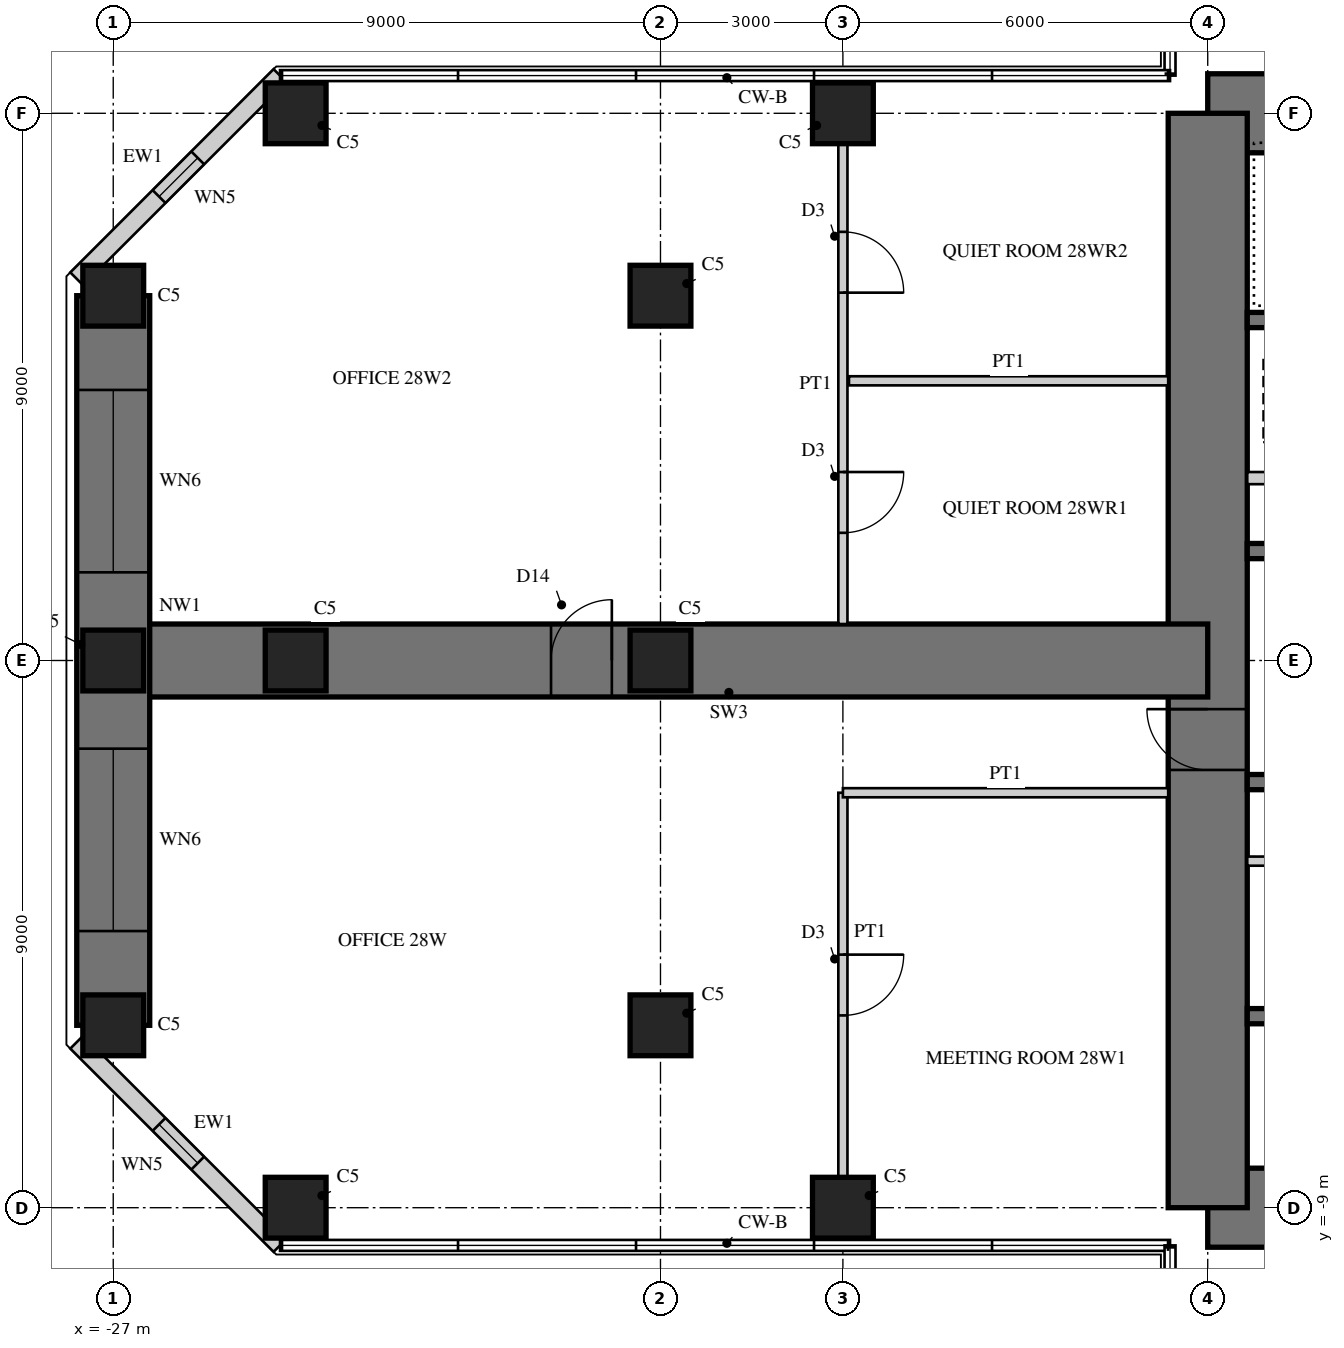
"""IFC4 building model, lengths in metres.
Left out: names, types, materials, properties, quantities, classifications, styles, units other than length and angle.
Written with IfcOpenShell. Run it as: python <this file> out.ifc"""

import sys

from ifc_helpers import new_model, si_unit, direction, frame, frame_2d, origin, origin_2d, place, context, subcontext, project, spatial, rectangle, hollow_rectangle, extrude, element, fill, save


model = new_model("IFC4")
c1 = context("Model", 3, precision=1e-05, world=origin(), true_north=direction((0.0, 1.0)))
c2 = subcontext(c1, "Body", "Model", "MODEL_VIEW")
j1 = project(units=[si_unit("LENGTHUNIT", "METRE"), si_unit("PLANEANGLEUNIT", "RADIAN")], contexts=[c1])
p1 = place(None, origin())
s1 = spatial("IfcSite", under=j1, at=p1, CompositionType="ELEMENT")
p2 = place(p1, origin())
s2 = spatial("IfcBuilding", under=s1, at=p2, CompositionType="ELEMENT")
p3 = place(p2, frame((0.0, 0.0, 116.5)))
s3 = spatial("IfcBuildingStorey", under=s2, at=p3, CompositionType="ELEMENT", Elevation=116.5)
p4 = place(p3, frame((9.0, 9.0, 0.0), z_axis=(0.0, 0.0, 1.0), x_axis=(-1.0, 0.0, 0.0)))
e1 = element("IfcWall", 1, at=p4, inside=s3, PredefinedType="SHEAR", context=c2, shape_type="SweptSolid", body=[
    extrude(rectangle(XDim=18.0, YDim=1.3, at=frame_2d((9.0, 0.0))), origin(), (0.0, 0.0, 1.0), 4.0),
])
p5 = place(p4, frame((9.8, 0.0, 0.0)))
e2 = element("IfcOpeningElement", 2, at=p5, cuts=e1, PredefinedType="OPENING", context=c2, shape_type="SweptSolid", body=[
    extrude(rectangle(XDim=1.0, YDim=2.4, at=frame_2d((0.5, 1.2))), frame((0.0, 0.66, 0.0), z_axis=(0.0, -1.0, 0.0), x_axis=(1.0, 0.0, 0.0)), (0.0, 0.0, 1.0), 1.32),
])
p6 = place(p3, frame((-9.0, -9.0, 0.0), z_axis=(0.0, 0.0, 1.0), x_axis=(1.0, 0.0, 0.0)))
e3 = element("IfcWall", 3, at=p6, inside=s3, PredefinedType="SHEAR", context=c2, shape_type="SweptSolid", body=[
    extrude(rectangle(XDim=18.0, YDim=1.3, at=frame_2d((9.0, 0.0))), origin(), (0.0, 0.0, 1.0), 4.0),
])
p7 = place(p6, frame((9.8, 0.0, 0.0)))
e4 = element("IfcOpeningElement", 4, at=p7, cuts=e3, PredefinedType="OPENING", context=c2, shape_type="SweptSolid", body=[
    extrude(rectangle(XDim=1.0, YDim=2.4, at=frame_2d((0.5, 1.2))), frame((0.0, 0.66, 0.0), z_axis=(0.0, -1.0, 0.0), x_axis=(1.0, 0.0, 0.0)), (0.0, 0.0, 1.0), 1.32),
])
p8 = place(p3, frame((-9.0, 9.0, 0.0), z_axis=(0.0, 0.0, 1.0), x_axis=(0.0, -1.0, 0.0)))
e5 = element("IfcWall", 5, at=p8, inside=s3, PredefinedType="SHEAR", context=c2, shape_type="SweptSolid", body=[
    extrude(rectangle(XDim=18.0, YDim=1.3, at=frame_2d((9.0, 0.0))), origin(), (0.0, 0.0, 1.0), 4.0),
])
p9 = place(p8, frame((9.8, 0.0, 0.0)))
e6 = element("IfcOpeningElement", 6, at=p9, cuts=e5, PredefinedType="OPENING", context=c2, shape_type="SweptSolid", body=[
    extrude(rectangle(XDim=1.0, YDim=2.4, at=frame_2d((0.5, 1.2))), frame((0.0, 0.66, 0.0), z_axis=(0.0, -1.0, 0.0), x_axis=(1.0, 0.0, 0.0)), (0.0, 0.0, 1.0), 1.32),
])
p10 = place(p3, frame((-2.125, 1.8, 0.0), z_axis=(0.0, 0.0, 1.0), x_axis=(-1.0, 0.0, 0.0)))
e7 = element("IfcWall", 7, at=p10, inside=s3, PredefinedType="SHEAR", context=c2, shape_type="SweptSolid", body=[
    extrude(rectangle(XDim=6.225, YDim=0.25, at=frame_2d((3.113, 0.0))), origin(), (0.0, 0.0, 1.0), 4.0),
])
p11 = place(p3, frame((-2.125, 5.6, 0.0), z_axis=(0.0, 0.0, 1.0), x_axis=(-1.0, 0.0, 0.0)))
e8 = element("IfcWall", 8, at=p11, inside=s3, PredefinedType="SHEAR", context=c2, shape_type="SweptSolid", body=[
    extrude(rectangle(XDim=6.225, YDim=0.25, at=frame_2d((3.113, 0.0))), origin(), (0.0, 0.0, 1.0), 4.0),
])
p12 = place(p11, frame((0.175, 0.0, 0.0)))
e9 = element("IfcOpeningElement", 9, at=p12, cuts=e8, PredefinedType="OPENING", context=c2, shape_type="SweptSolid", body=[
    extrude(rectangle(XDim=1.0, YDim=2.1, at=frame_2d((0.5, 1.05))), frame((0.0, 0.135, 0.0), z_axis=(0.0, -1.0, 0.0), x_axis=(1.0, 0.0, 0.0)), (0.0, 0.0, 1.0), 0.27),
])
p13 = place(p3, frame((-5.725, 3.0, 0.0), z_axis=(0.0, 0.0, 1.0), x_axis=(-1.0, 0.0, 0.0)))
e10 = element("IfcWall", 10, at=p13, inside=s3, PredefinedType="PARTITIONING", context=c2, shape_type="SweptSolid", body=[
    extrude(rectangle(XDim=2.625, YDim=0.2, at=frame_2d((1.312, 0.0))), origin(), (0.0, 0.0, 1.0), 4.0),
])
for number, where, z_axis, x_axis in (
    (11, (-1.925, -2.0, 0.0), (0.0, 0.0, 1.0), (-1.0, 0.0, 0.0)),
    (12, (-1.925, -5.85, 0.0), (0.0, 0.0, 1.0), (-1.0, 0.0, 0.0)),
):
    element("IfcWall", number, at=place(p3, frame(where, z_axis=z_axis, x_axis=x_axis)), inside=s3, PredefinedType="SHEAR", context=c2, shape_type="SweptSolid", body=[
        extrude(rectangle(XDim=6.425, YDim=0.25, at=frame_2d((3.212, 0.0))), origin(), (0.0, 0.0, 1.0), 4.0),
    ])
p14 = place(p3, frame((-1.925, -3.3, 0.0), z_axis=(0.0, 0.0, 1.0), x_axis=(-1.0, 0.0, 0.0)))
e13 = element("IfcWall", 13, at=p14, inside=s3, PredefinedType="PARTITIONING", context=c2, shape_type="SweptSolid", body=[
    extrude(rectangle(XDim=6.425, YDim=0.15, at=frame_2d((3.212, 0.0))), origin(), (0.0, 0.0, 1.0), 4.0),
])
p15 = place(p14, frame((0.075, 0.0, 0.0)))
e14 = element("IfcOpeningElement", 14, at=p15, cuts=e13, PredefinedType="OPENING", context=c2, shape_type="SweptSolid", body=[
    extrude(rectangle(XDim=0.8, YDim=2.1, at=frame_2d((0.4, 1.05))), frame((0.0, 0.085, 0.0), z_axis=(0.0, -1.0, 0.0), x_axis=(1.0, 0.0, 0.0)), (0.0, 0.0, 1.0), 0.17),
])
p16 = place(p14, frame((3.675, 0.0, 0.0)))
e15 = element("IfcOpeningElement", 15, at=p16, cuts=e13, PredefinedType="OPENING", context=c2, shape_type="SweptSolid", body=[
    extrude(rectangle(XDim=0.8, YDim=2.1, at=frame_2d((0.4, 1.05))), frame((0.0, 0.085, 0.0), z_axis=(0.0, -1.0, 0.0), x_axis=(1.0, 0.0, 0.0)), (0.0, 0.0, 1.0), 0.17),
])
p17 = place(p3, frame((-9.0, 0.0, 0.0), z_axis=(0.0, 0.0, 1.0), x_axis=(-1.0, 0.0, 0.0)))
e16 = element("IfcWall", 16, at=p17, inside=s3, PredefinedType="SHEAR", context=c2, shape_type="SweptSolid", body=[
    extrude(rectangle(XDim=18.0, YDim=1.2, at=frame_2d((9.0, 0.0))), origin(), (0.0, 0.0, 1.0), 4.0),
])
p18 = place(p17, frame((9.8, 0.0, 0.0)))
e17 = element("IfcOpeningElement", 17, at=p18, cuts=e16, PredefinedType="OPENING", context=c2, shape_type="SweptSolid", body=[
    extrude(rectangle(XDim=1.0, YDim=2.2, at=frame_2d((0.5, 1.1))), frame((0.0, 0.61, 0.0), z_axis=(0.0, -1.0, 0.0), x_axis=(1.0, 0.0, 0.0)), (0.0, 0.0, 1.0), 1.22),
])
p19 = place(p3, frame((-27.0, 6.0, 0.0), z_axis=(0.0, 0.0, 1.0), x_axis=(0.0, -1.0, 0.0)))
e18 = element("IfcWall", 18, at=p19, inside=s3, PredefinedType="SHEAR", context=c2, shape_type="SweptSolid", body=[
    extrude(rectangle(XDim=12.0, YDim=1.2, at=frame_2d((6.0, 0.0))), origin(), (0.0, 0.0, 1.0), 4.0),
])
p20 = place(p19, frame((1.55, 0.0, 0.6)))
e19 = element("IfcOpeningElement", 19, at=p20, cuts=e18, PredefinedType="OPENING", context=c2, shape_type="SweptSolid", body=[
    extrude(rectangle(XDim=3.0, YDim=2.4, at=frame_2d((1.5, 1.2))), frame((0.0, 0.61, 0.0), z_axis=(0.0, -1.0, 0.0), x_axis=(1.0, 0.0, 0.0)), (0.0, 0.0, 1.0), 1.22),
])
p21 = place(p19, frame((7.45, 0.0, 0.6)))
e20 = element("IfcOpeningElement", 20, at=p21, cuts=e18, PredefinedType="OPENING", context=c2, shape_type="SweptSolid", body=[
    extrude(rectangle(XDim=3.0, YDim=2.4, at=frame_2d((1.5, 1.2))), frame((0.0, 0.61, 0.0), z_axis=(0.0, -1.0, 0.0), x_axis=(1.0, 0.0, 0.0)), (0.0, 0.0, 1.0), 1.22),
])
for number, where, z_axis, x_axis in (
    (21, (-15.0, 9.0, 0.0), (0.0, 0.0, 1.0), (1.0, 0.0, 0.0)),
    (22, (-24.0, 9.0, 0.0), (0.0, 0.0, 1.0), (1.0, 0.0, 0.0)),
    (23, (-15.0, -9.0, 0.0), (0.0, 0.0, 1.0), (1.0, 0.0, 0.0)),
    (24, (-24.0, -9.0, 0.0), (0.0, 0.0, 1.0), (1.0, 0.0, 0.0)),
    (25, (-27.0, 6.0, 0.0), (0.0, 0.0, 1.0), (1.0, 0.0, 0.0)),
    (26, (-27.0, 0.0, 0.0), (0.0, 0.0, 1.0), (1.0, 0.0, 0.0)),
    (27, (-27.0, -6.0, 0.0), (0.0, 0.0, 1.0), (1.0, 0.0, 0.0)),
    (28, (-18.0, 6.0, 0.0), (0.0, 0.0, 1.0), (1.0, 0.0, 0.0)),
    (29, (-18.0, 0.0, 0.0), (0.0, 0.0, 1.0), (1.0, 0.0, 0.0)),
    (30, (-18.0, -6.0, 0.0), (0.0, 0.0, 1.0), (1.0, 0.0, 0.0)),
    (31, (-24.0, 0.0, 0.0), (0.0, 0.0, 1.0), (1.0, 0.0, 0.0)),
):
    element("IfcColumn", number, at=place(p3, frame(where, z_axis=z_axis, x_axis=x_axis)), inside=s3, PredefinedType="COLUMN", context=c2, shape_type="SweptSolid", body=[
        extrude(rectangle(XDim=1.0, YDim=1.0, at=origin_2d()), origin(), (0.0, 0.0, 1.0), 4.0),
    ])
p22 = place(p3, frame((-24.257, 9.62, 0.0), z_axis=(0.0, 0.0, 1.0), x_axis=(-0.707106781187, -0.707106781187, 0.0)))
e32 = element("IfcWall", 32, at=p22, inside=s3, PredefinedType="SOLIDWALL", context=c2, shape_type="SweptSolid", body=[
    extrude(rectangle(XDim=4.728, YDim=0.3, at=frame_2d((2.364, 0.0))), origin(), (0.0, 0.0, 1.0), 3.8),
])
p23 = place(p22, frame((1.914, 0.0, 0.3)))
e33 = element("IfcOpeningElement", 33, at=p23, cuts=e32, PredefinedType="OPENING", context=c2, shape_type="SweptSolid", body=[
    extrude(rectangle(XDim=0.9, YDim=2.4, at=frame_2d((0.45, 1.2))), frame((0.0, 0.16, 0.0), z_axis=(0.0, -1.0, 0.0), x_axis=(1.0, 0.0, 0.0)), (0.0, 0.0, 1.0), 0.32),
])
p24 = place(p3, frame((-27.6, -6.277, 0.0), z_axis=(0.0, 0.0, 1.0), x_axis=(0.707106781187, -0.707106781187, 0.0)))
e34 = element("IfcWall", 34, at=p24, inside=s3, PredefinedType="SOLIDWALL", context=c2, shape_type="SweptSolid", body=[
    extrude(rectangle(XDim=4.728, YDim=0.3, at=frame_2d((2.364, 0.0))), origin(), (0.0, 0.0, 1.0), 3.8),
])
p25 = place(p24, frame((1.914, 0.0, 0.3)))
e35 = element("IfcOpeningElement", 35, at=p25, cuts=e34, PredefinedType="OPENING", context=c2, shape_type="SweptSolid", body=[
    extrude(rectangle(XDim=0.9, YDim=2.4, at=frame_2d((0.45, 1.2))), frame((0.0, 0.16, 0.0), z_axis=(0.0, -1.0, 0.0), x_axis=(1.0, 0.0, 0.0)), (0.0, 0.0, 1.0), 0.32),
])
p26 = place(p3, frame((-15.0, -2.175, 0.0), z_axis=(0.0, 0.0, 1.0), x_axis=(0.0, -1.0, 0.0)))
e36 = element("IfcWall", 36, at=p26, inside=s3, PredefinedType="PARTITIONING", context=c2, shape_type="SweptSolid", body=[
    extrude(rectangle(XDim=6.325, YDim=0.15, at=frame_2d((3.163, 0.0))), origin(), (0.0, 0.0, 1.0), 3.0),
])
p27 = place(p26, frame((2.663, 0.0, 0.0)))
e37 = element("IfcOpeningElement", 37, at=p27, cuts=e36, PredefinedType="OPENING", context=c2, shape_type="SweptSolid", body=[
    extrude(rectangle(XDim=1.0, YDim=2.1, at=frame_2d((0.5, 1.05))), frame((0.0, 0.085, 0.0), z_axis=(0.0, -1.0, 0.0), x_axis=(1.0, 0.0, 0.0)), (0.0, 0.0, 1.0), 0.17),
])
p28 = place(p3, frame((-9.65, -2.175, 0.0), z_axis=(0.0, 0.0, 1.0), x_axis=(-1.0, 0.0, 0.0)))
e38 = element("IfcWall", 38, at=p28, inside=s3, PredefinedType="PARTITIONING", context=c2, shape_type="SweptSolid", body=[
    extrude(rectangle(XDim=5.35, YDim=0.15, at=frame_2d((2.675, 0.0))), origin(), (0.0, 0.0, 1.0), 3.8),
])
p29 = place(p3, frame((-15.0, 8.5, 0.0), z_axis=(0.0, 0.0, 1.0), x_axis=(0.0, -1.0, 0.0)))
e39 = element("IfcWall", 39, at=p29, inside=s3, PredefinedType="PARTITIONING", context=c2, shape_type="SweptSolid", body=[
    extrude(rectangle(XDim=7.9, YDim=0.15, at=frame_2d((3.95, 0.0))), origin(), (0.0, 0.0, 1.0), 3.0),
])
p30 = place(p29, frame((1.45, 0.0, 0.0)))
e40 = element("IfcOpeningElement", 40, at=p30, cuts=e39, PredefinedType="OPENING", context=c2, shape_type="SweptSolid", body=[
    extrude(rectangle(XDim=1.0, YDim=2.1, at=frame_2d((0.5, 1.05))), frame((0.0, 0.085, 0.0), z_axis=(0.0, -1.0, 0.0), x_axis=(1.0, 0.0, 0.0)), (0.0, 0.0, 1.0), 0.17),
])
p31 = place(p29, frame((5.4, 0.0, 0.0)))
e41 = element("IfcOpeningElement", 41, at=p31, cuts=e39, PredefinedType="OPENING", context=c2, shape_type="SweptSolid", body=[
    extrude(rectangle(XDim=1.0, YDim=2.1, at=frame_2d((0.5, 1.05))), frame((0.0, 0.085, 0.0), z_axis=(0.0, -1.0, 0.0), x_axis=(1.0, 0.0, 0.0)), (0.0, 0.0, 1.0), 0.17),
])
p32 = place(p3, frame((-9.65, 4.6, 0.0), z_axis=(0.0, 0.0, 1.0), x_axis=(-1.0, 0.0, 0.0)))
e42 = element("IfcWall", 42, at=p32, inside=s3, PredefinedType="PARTITIONING", context=c2, shape_type="SweptSolid", body=[
    extrude(rectangle(XDim=5.25, YDim=0.15, at=frame_2d((2.625, 0.0))), origin(), (0.0, 0.0, 1.0), 3.8),
])
p33 = place(p23, origin())
e43 = element("IfcWindow", 43, at=p33, inside=s3, PartitioningType="SINGLE_PANEL", PredefinedType="WINDOW", context=c2, shape_type="SweptSolid", body=[
    extrude(hollow_rectangle(XDim=0.9, YDim=2.4, WallThickness=0.06, at=frame_2d((0.45, 1.2))), frame((0.0, 0.03, 0.0), z_axis=(0.0, -1.0, 0.0), x_axis=(1.0, 0.0, 0.0)), (0.0, 0.0, 1.0), 0.06),
    extrude(rectangle(XDim=0.779, YDim=2.279, at=frame_2d((0.45, 1.2))), frame((0.0, 0.03, 0.0), z_axis=(0.0, -1.0, 0.0), x_axis=(1.0, 0.0, 0.0)), (0.0, 0.0, 1.0), 0.06),
])
fill(e33, e43)
p34 = place(p20, origin())
e44 = element("IfcWindow", 44, at=p34, inside=s3, PartitioningType="SINGLE_PANEL", PredefinedType="WINDOW", context=c2, shape_type="SweptSolid", body=[
    extrude(hollow_rectangle(XDim=3.0, YDim=2.4, WallThickness=0.06, at=frame_2d((1.5, 1.2))), frame((0.0, 0.03, 0.0), z_axis=(0.0, -1.0, 0.0), x_axis=(1.0, 0.0, 0.0)), (0.0, 0.0, 1.0), 0.06),
    extrude(rectangle(XDim=2.879, YDim=2.279, at=frame_2d((1.5, 1.2))), frame((0.0, 0.03, 0.0), z_axis=(0.0, -1.0, 0.0), x_axis=(1.0, 0.0, 0.0)), (0.0, 0.0, 1.0), 0.06),
])
fill(e19, e44)
p35 = place(p21, origin())
e45 = element("IfcWindow", 45, at=p35, inside=s3, PartitioningType="SINGLE_PANEL", PredefinedType="WINDOW", context=c2, shape_type="SweptSolid", body=[
    extrude(hollow_rectangle(XDim=3.0, YDim=2.4, WallThickness=0.06, at=frame_2d((1.5, 1.2))), frame((0.0, 0.03, 0.0), z_axis=(0.0, -1.0, 0.0), x_axis=(1.0, 0.0, 0.0)), (0.0, 0.0, 1.0), 0.06),
    extrude(rectangle(XDim=2.879, YDim=2.279, at=frame_2d((1.5, 1.2))), frame((0.0, 0.03, 0.0), z_axis=(0.0, -1.0, 0.0), x_axis=(1.0, 0.0, 0.0)), (0.0, 0.0, 1.0), 0.06),
])
fill(e20, e45)
p36 = place(p25, origin())
e46 = element("IfcWindow", 46, at=p36, inside=s3, PartitioningType="SINGLE_PANEL", PredefinedType="WINDOW", context=c2, shape_type="SweptSolid", body=[
    extrude(hollow_rectangle(XDim=0.9, YDim=2.4, WallThickness=0.06, at=frame_2d((0.45, 1.2))), frame((0.0, 0.03, 0.0), z_axis=(0.0, -1.0, 0.0), x_axis=(1.0, 0.0, 0.0)), (0.0, 0.0, 1.0), 0.06),
    extrude(rectangle(XDim=0.779, YDim=2.279, at=frame_2d((0.45, 1.2))), frame((0.0, 0.03, 0.0), z_axis=(0.0, -1.0, 0.0), x_axis=(1.0, 0.0, 0.0)), (0.0, 0.0, 1.0), 0.06),
])
fill(e35, e46)
p37 = place(p27, origin())
e47 = element("IfcDoor", 47, at=p37, inside=s3, OperationType="SINGLE_SWING_LEFT", PredefinedType="DOOR", context=c2, shape_type="SweptSolid", body=[
    extrude(rectangle(XDim=1.0, YDim=2.1, at=frame_2d((0.5, 1.05))), frame((0.0, 0.025, 0.0), z_axis=(0.0, -1.0, 0.0), x_axis=(1.0, 0.0, 0.0)), (0.0, 0.0, 1.0), 0.05),
])
fill(e37, e47)
p38 = place(p30, origin())
e48 = element("IfcDoor", 48, at=p38, inside=s3, OperationType="SINGLE_SWING_RIGHT", PredefinedType="DOOR", context=c2, shape_type="SweptSolid", body=[
    extrude(rectangle(XDim=1.0, YDim=2.1, at=frame_2d((0.5, 1.05))), frame((0.0, 0.025, 0.0), z_axis=(0.0, -1.0, 0.0), x_axis=(1.0, 0.0, 0.0)), (0.0, 0.0, 1.0), 0.05),
])
fill(e40, e48)
p39 = place(p31, origin())
e49 = element("IfcDoor", 49, at=p39, inside=s3, OperationType="SINGLE_SWING_LEFT", PredefinedType="DOOR", context=c2, shape_type="SweptSolid", body=[
    extrude(rectangle(XDim=1.0, YDim=2.1, at=frame_2d((0.5, 1.05))), frame((0.0, 0.025, 0.0), z_axis=(0.0, -1.0, 0.0), x_axis=(1.0, 0.0, 0.0)), (0.0, 0.0, 1.0), 0.05),
])
fill(e41, e49)
p40 = place(p18, frame((1.0, 0.0, 0.0), z_axis=(0.0, 0.0, 1.0), x_axis=(-1.0, 0.0, 0.0)))
e50 = element("IfcDoor", 50, at=p40, inside=s3, OperationType="SINGLE_SWING_RIGHT", PredefinedType="DOOR", context=c2, shape_type="SweptSolid", body=[
    extrude(rectangle(XDim=1.0, YDim=2.2, at=frame_2d((0.5, 1.1))), frame((0.0, 0.025, 0.0), z_axis=(0.0, -1.0, 0.0), x_axis=(1.0, 0.0, 0.0)), (0.0, 0.0, 1.0), 0.05),
])
fill(e17, e50)
p41 = place(p9, frame((1.0, 0.0, 0.0), z_axis=(0.0, 0.0, 1.0), x_axis=(-1.0, 0.0, 0.0)))
e51 = element("IfcDoor", 51, at=p41, inside=s3, OperationType="SINGLE_SWING_RIGHT", PredefinedType="DOOR", context=c2, shape_type="SweptSolid", body=[
    extrude(rectangle(XDim=1.0, YDim=2.4, at=frame_2d((0.5, 1.2))), frame((0.0, -0.005, 0.0), z_axis=(0.0, -1.0, 0.0), x_axis=(1.0, 0.0, 0.0)), (0.0, 0.0, 1.0), 0.05),
])
fill(e6, e51)
save(model, sys.argv[1])
